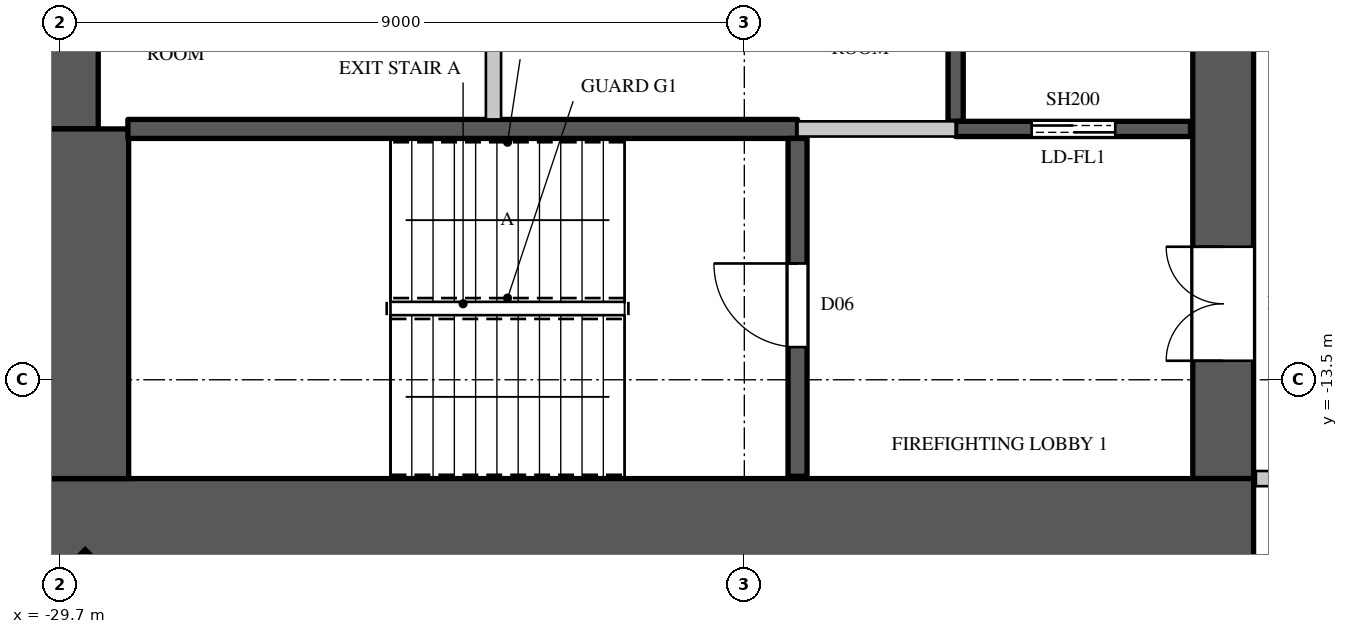
"""IFC4 building model, lengths in metres.
Left out: names, types, materials, properties, quantities, classifications, styles, units other than length and angle.
Written with IfcOpenShell. Run it as: python <this file> out.ifc"""

import sys

from ifc_helpers import new_model, si_unit, direction, frame, frame_2d, origin, origin_2d, place, context, subcontext, project, spatial, rectangle, extrude, element, fill, save


model = new_model("IFC4")
c1 = context("Model", 3, precision=1e-05, world=origin(), true_north=direction((0.0, 1.0)))
c2 = subcontext(c1, "Body", "Model", "MODEL_VIEW")
j1 = project(units=[si_unit("LENGTHUNIT", "METRE"), si_unit("PLANEANGLEUNIT", "RADIAN")], contexts=[c1])
p1 = place(None, origin())
s1 = spatial("IfcSite", under=j1, at=p1, CompositionType="ELEMENT")
p2 = place(p1, origin())
s2 = spatial("IfcBuilding", under=s1, at=p2, CompositionType="ELEMENT")
p3 = place(p2, frame((0.0, 0.0, 193.3)))
s3 = spatial("IfcBuildingStorey", under=s2, at=p3, CompositionType="ELEMENT", Elevation=193.3)
p4 = place(p3, frame((-29.443, -16.443, 0.0), z_axis=(0.0, 0.0, 1.0), x_axis=(0.707106781187, -0.707106781187, 0.0)))
e1 = element("IfcColumn", 1, at=p4, inside=s3, PredefinedType="COLUMN", context=c2, shape_type="SweptSolid", body=[
    extrude(rectangle(XDim=0.9, YDim=1.1, at=origin_2d()), origin(), (0.0, 0.0, 1.0), 4.1),
])
p5 = place(p3, frame((-30.0, -15.4, 0.0), z_axis=(0.0, 0.0, 1.0), x_axis=(1.0, 0.0, 0.0)))
e2 = element("IfcWall", 2, at=p5, inside=s3, PredefinedType="SHEAR", context=c2, shape_type="SweptSolid", body=[
    extrude(rectangle(XDim=16.0, YDim=1.2, at=frame_2d((8.0, 0.0))), origin(), (0.0, 0.0, 1.0), 4.1),
])
p6 = place(p3, frame((-14.4, -14.8, 0.0), z_axis=(0.0, 0.0, 1.0), x_axis=(0.0, 1.0, 0.0)))
e3 = element("IfcWall", 3, at=p6, inside=s3, PredefinedType="SHEAR", context=c2, shape_type="SweptSolid", body=[
    extrude(rectangle(XDim=29.6, YDim=0.8, at=frame_2d((14.8, 0.0))), origin(), (0.0, 0.0, 1.0), 4.1),
])
p7 = place(p6, frame((1.55, 0.0, 0.0)))
e4 = element("IfcOpeningElement", 4, at=p7, cuts=e3, PredefinedType="OPENING", context=c2, shape_type="SweptSolid", body=[
    extrude(rectangle(XDim=1.5, YDim=2.4, at=frame_2d((0.75, 1.2))), frame((0.0, 0.41, 0.0), z_axis=(0.0, -1.0, 0.0), x_axis=(1.0, 0.0, 0.0)), (0.0, 0.0, 1.0), 0.82),
])
p8 = place(p6, frame((26.55, 0.0, 0.0)))
e5 = element("IfcOpeningElement", 5, at=p8, cuts=e3, PredefinedType="OPENING", context=c2, shape_type="SweptSolid", body=[
    extrude(rectangle(XDim=1.5, YDim=2.4, at=frame_2d((0.75, 1.2))), frame((0.0, 0.41, 0.0), z_axis=(0.0, -1.0, 0.0), x_axis=(1.0, 0.0, 0.0)), (0.0, 0.0, 1.0), 0.82),
])
p9 = place(p6, frame((8.45, 0.0, 0.0)))
e6 = element("IfcOpeningElement", 6, at=p9, cuts=e3, PredefinedType="OPENING", context=c2, shape_type="SweptSolid", body=[
    extrude(rectangle(XDim=1.5, YDim=2.4, at=frame_2d((0.75, 1.2))), frame((0.0, 0.41, 0.0), z_axis=(0.0, -1.0, 0.0), x_axis=(1.0, 0.0, 0.0)), (0.0, 0.0, 1.0), 0.82),
])
p10 = place(p6, frame((19.65, 0.0, 0.0)))
e7 = element("IfcOpeningElement", 7, at=p10, cuts=e3, PredefinedType="OPENING", context=c2, shape_type="SweptSolid", body=[
    extrude(rectangle(XDim=1.5, YDim=2.4, at=frame_2d((0.75, 1.2))), frame((0.0, 0.41, 0.0), z_axis=(0.0, -1.0, 0.0), x_axis=(1.0, 0.0, 0.0)), (0.0, 0.0, 1.0), 0.82),
])
p11 = place(p6, frame((14.5, 0.0, 0.0)))
e8 = element("IfcOpeningElement", 8, at=p11, cuts=e3, PredefinedType="OPENING", context=c2, shape_type="SweptSolid", body=[
    extrude(rectangle(XDim=0.6, YDim=2.0, at=frame_2d((0.3, 1.0))), frame((0.0, 0.41, 0.0), z_axis=(0.0, -1.0, 0.0), x_axis=(1.0, 0.0, 0.0)), (0.0, 0.0, 1.0), 0.82),
])
p12 = place(p3, frame((-29.6, -10.2, 0.0), z_axis=(0.0, 0.0, 1.0), x_axis=(0.0, 1.0, 0.0)))
e9 = element("IfcWall", 9, at=p12, inside=s3, PredefinedType="SHEAR", context=c2, shape_type="SweptSolid", body=[
    extrude(rectangle(XDim=20.4, YDim=0.8, at=frame_2d((10.2, 0.0))), origin(), (0.0, 0.0, 1.0), 4.1),
])
p13 = place(p3, frame((-29.4, -14.8, 0.0), z_axis=(0.0, 0.0, 1.0), x_axis=(0.0, 1.0, 0.0)))
e10 = element("IfcWall", 10, at=p13, inside=s3, PredefinedType="SHEAR", context=c2, shape_type="SweptSolid", body=[
    extrude(rectangle(XDim=4.6, YDim=1.2, at=frame_2d((2.3, 0.0))), origin(), (0.0, 0.0, 1.0), 4.1),
])
p14 = place(p3, frame((-13.97, -14.8, 0.0), z_axis=(0.0, 0.0, 1.0), x_axis=(1.0, 0.0, 0.0)))
e11 = element("IfcWall", 11, at=p14, inside=s3, PredefinedType="PARTITIONING", context=c2, shape_type="SweptSolid", body=[
    extrude(rectangle(XDim=2.87, YDim=0.2, at=frame_2d((1.435, 0.0))), origin(), (0.0, 0.0, 1.0), 3.8),
])
p15 = place(p3, frame((-24.0, -10.075, 0.0), z_axis=(0.0, 0.0, 1.0), x_axis=(0.0, 1.0, 0.0)))
e12 = element("IfcWall", 12, at=p15, inside=s3, PredefinedType="PARTITIONING", context=c2, shape_type="SweptSolid", body=[
    extrude(rectangle(XDim=2.575, YDim=0.2, at=frame_2d((1.288, 0.0))), origin(), (0.0, 0.0, 1.0), 3.8),
])
p16 = place(p3, frame((-20.0, -10.2, 0.0), z_axis=(0.0, 0.0, 1.0), x_axis=(1.0, 0.0, 0.0)))
e13 = element("IfcWall", 13, at=p16, inside=s3, PredefinedType="PARTITIONING", context=c2, shape_type="SweptSolid", body=[
    extrude(rectangle(XDim=2.08, YDim=0.2, at=frame_2d((1.04, 0.0))), origin(), (0.0, 0.0, 1.0), 3.8),
])
p17 = place(p3, frame((-17.92, -10.1, 0.0), z_axis=(0.0, 0.0, 1.0), x_axis=(0.0, 1.0, 0.0)))
e14 = element("IfcWall", 14, at=p17, inside=s3, PredefinedType="SHEAR", context=c2, shape_type="SweptSolid", body=[
    extrude(rectangle(XDim=2.6, YDim=0.2, at=frame_2d((1.3, 0.0))), origin(), (0.0, 0.0, 1.0), 3.8),
])
p18 = place(p3, frame((-17.92, -10.2, 0.0), z_axis=(0.0, 0.0, 1.0), x_axis=(1.0, 0.0, 0.0)))
e15 = element("IfcWall", 15, at=p18, inside=s3, PredefinedType="SHEAR", context=c2, shape_type="SweptSolid", body=[
    extrude(rectangle(XDim=3.09, YDim=0.2, at=frame_2d((1.545, 0.0))), origin(), (0.0, 0.0, 1.0), 3.8),
])
p19 = place(p18, frame((1.0, 0.0, 0.0)))
e16 = element("IfcOpeningElement", 16, at=p19, cuts=e15, PredefinedType="OPENING", context=c2, shape_type="SweptSolid", body=[
    extrude(rectangle(XDim=1.1, YDim=2.2, at=frame_2d((0.55, 1.1))), frame((0.0, 0.11, 0.0), z_axis=(0.0, -1.0, 0.0), x_axis=(1.0, 0.0, 0.0)), (0.0, 0.0, 1.0), 0.22),
])
p20 = place(p3, frame((-28.81, -10.2, 0.0), z_axis=(0.0, 0.0, 1.0), x_axis=(1.0, 0.0, 0.0)))
e17 = element("IfcWall", 17, at=p20, inside=s3, PredefinedType="SHEAR", context=c2, shape_type="SweptSolid", body=[
    extrude(rectangle(XDim=8.81, YDim=0.25, at=frame_2d((4.405, 0.0))), origin(), (0.0, 0.0, 1.0), 3.8),
])
p21 = place(p3, frame((-20.0, -14.77, 0.0), z_axis=(0.0, 0.0, 1.0), x_axis=(0.0, 1.0, 0.0)))
e18 = element("IfcWall", 18, at=p21, inside=s3, PredefinedType="SHEAR", context=c2, shape_type="SweptSolid", body=[
    extrude(rectangle(XDim=4.445, YDim=0.25, at=frame_2d((2.223, 0.0))), origin(), (0.0, 0.0, 1.0), 3.8),
])
p22 = place(p21, frame((1.7, 0.0, 0.0)))
e19 = element("IfcOpeningElement", 19, at=p22, cuts=e18, PredefinedType="OPENING", context=c2, shape_type="SweptSolid", body=[
    extrude(rectangle(XDim=1.1, YDim=2.2, at=frame_2d((0.55, 1.1))), frame((0.0, 0.135, 0.0), z_axis=(0.0, -1.0, 0.0), x_axis=(1.0, 0.0, 0.0)), (0.0, 0.0, 1.0), 0.27),
])
p23 = place(p22, origin())
e20 = element("IfcDoor", 20, at=p23, inside=s3, OperationType="SINGLE_SWING_RIGHT", PredefinedType="DOOR", context=c2, shape_type="SweptSolid", body=[
    extrude(rectangle(XDim=1.1, YDim=2.2, at=frame_2d((0.55, 1.1))), frame((0.0, 0.025, 0.0), z_axis=(0.0, -1.0, 0.0), x_axis=(1.0, 0.0, 0.0)), (0.0, 0.0, 1.0), 0.05),
])
fill(e19, e20)
p24 = place(p19, origin())
e21 = element("IfcDoor", 21, at=p24, inside=s3, OperationType="DOUBLE_DOOR_SLIDING", PredefinedType="DOOR", context=c2, shape_type="SweptSolid", body=[
    extrude(rectangle(XDim=1.1, YDim=2.2, at=frame_2d((0.55, 1.1))), frame((0.0, 0.025, 0.0), z_axis=(0.0, -1.0, 0.0), x_axis=(1.0, 0.0, 0.0)), (0.0, 0.0, 1.0), 0.05),
])
fill(e16, e21)
p25 = place(p7, origin())
e22 = element("IfcDoor", 22, at=p25, inside=s3, OperationType="DOUBLE_DOOR_SINGLE_SWING", PredefinedType="DOOR", context=c2, shape_type="SweptSolid", body=[
    extrude(rectangle(XDim=1.5, YDim=2.4, at=frame_2d((0.75, 1.2))), frame((0.0, 0.395, 0.0), z_axis=(0.0, -1.0, 0.0), x_axis=(1.0, 0.0, 0.0)), (0.0, 0.0, 1.0), 0.05),
])
fill(e4, e22)
save(model, sys.argv[1])
